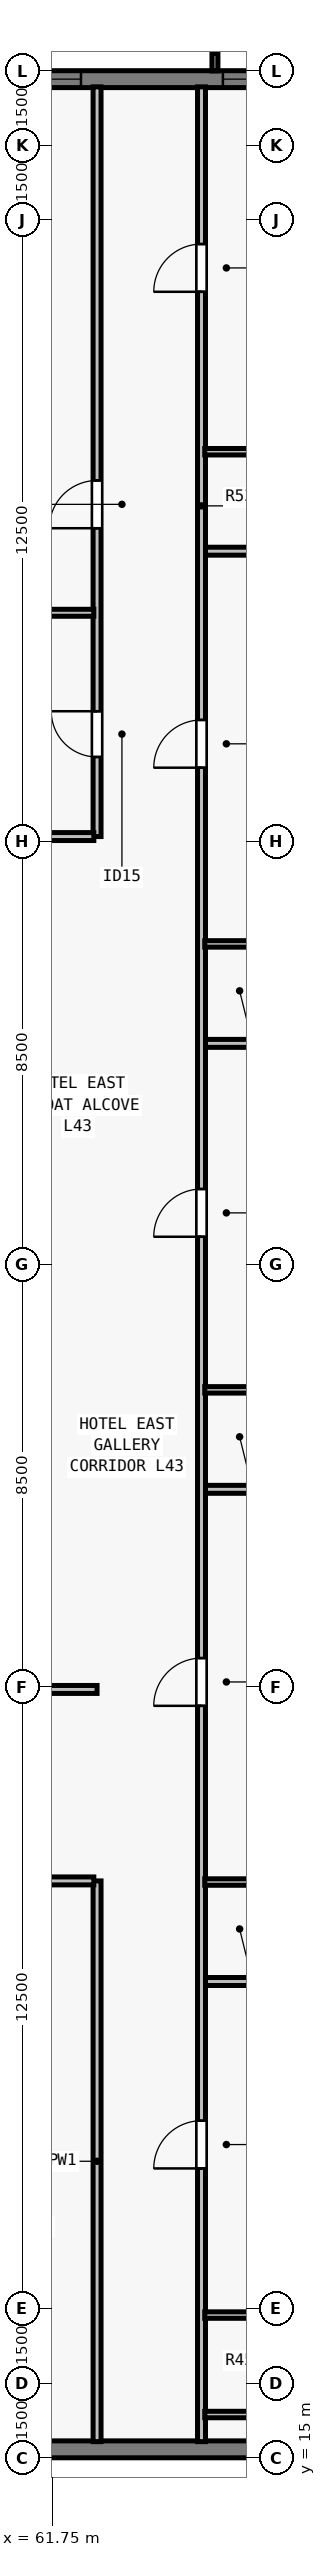
"""IFC4 building model, lengths in metres.
Left out: names, types, materials, properties, quantities, classifications, styles, units other than length and angle.
Written with IfcOpenShell. Run it as: python <this file> out.ifc"""

import sys

from ifc_helpers import new_model, si_unit, direction, frame, frame_2d, origin, place, context, subcontext, project, spatial, rectangle, extrude, element, fill, save


model = new_model("IFC4")
c1 = context("Model", 3, precision=1e-05, world=origin(), true_north=direction((0.0, 1.0)))
c2 = subcontext(c1, "Body", "Model", "MODEL_VIEW")
j1 = project(units=[si_unit("LENGTHUNIT", "METRE"), si_unit("PLANEANGLEUNIT", "RADIAN")], contexts=[c1])
p1 = place(None, origin())
s1 = spatial("IfcSite", under=j1, at=p1, CompositionType="ELEMENT")
p2 = place(p1, origin())
s2 = spatial("IfcBuilding", under=s1, at=p2, CompositionType="ELEMENT")
p3 = place(p2, frame((0.0, 0.0, 158.5)))
s3 = spatial("IfcBuildingStorey", under=s2, at=p3, CompositionType="ELEMENT", Elevation=158.5)
p4 = place(p3, frame((32.0, 62.83, 0.0), z_axis=(0.0, 0.0, 1.0), x_axis=(1.0, 0.0, 0.0)))
e1 = element("IfcWall", 1, at=p4, inside=s3, PredefinedType="SOLIDWALL", context=c2, shape_type="SweptSolid", body=[
    extrude(rectangle(XDim=39.682, YDim=0.34, at=frame_2d((19.841, 0.0))), origin(), (0.0, 0.0, 1.0), 3.28),
])
p5 = place(p4, frame((3.902, 0.0, 0.8)))
e2 = element("IfcOpeningElement", 2, at=p5, cuts=e1, PredefinedType="OPENING", context=c2, shape_type="SweptSolid", body=[
    extrude(rectangle(XDim=1.75, YDim=1.66, at=frame_2d((0.875, 0.83))), frame((0.0, 0.18, 0.0), z_axis=(0.0, -1.0, 0.0), x_axis=(1.0, 0.0, 0.0)), (0.0, 0.0, 1.0), 0.36),
])
p6 = place(p4, frame((8.955, 0.0, 0.8)))
e3 = element("IfcOpeningElement", 3, at=p6, cuts=e1, PredefinedType="OPENING", context=c2, shape_type="SweptSolid", body=[
    extrude(rectangle(XDim=1.35, YDim=1.66, at=frame_2d((0.675, 0.83))), frame((0.0, 0.18, 0.0), z_axis=(0.0, -1.0, 0.0), x_axis=(1.0, 0.0, 0.0)), (0.0, 0.0, 1.0), 0.36),
])
p7 = place(p4, frame((11.859, 0.0, 0.8)))
e4 = element("IfcOpeningElement", 4, at=p7, cuts=e1, PredefinedType="OPENING", context=c2, shape_type="SweptSolid", body=[
    extrude(rectangle(XDim=1.75, YDim=1.66, at=frame_2d((0.875, 0.83))), frame((0.0, 0.18, 0.0), z_axis=(0.0, -1.0, 0.0), x_axis=(1.0, 0.0, 0.0)), (0.0, 0.0, 1.0), 0.36),
])
p8 = place(p4, frame((16.062, 0.0, 0.8)))
e5 = element("IfcOpeningElement", 5, at=p8, cuts=e1, PredefinedType="OPENING", context=c2, shape_type="SweptSolid", body=[
    extrude(rectangle(XDim=1.35, YDim=1.66, at=frame_2d((0.675, 0.83))), frame((0.0, 0.18, 0.0), z_axis=(0.0, -1.0, 0.0), x_axis=(1.0, 0.0, 0.0)), (0.0, 0.0, 1.0), 0.36),
])
p9 = place(p4, frame((18.966, 0.0, 0.8)))
e6 = element("IfcOpeningElement", 6, at=p9, cuts=e1, PredefinedType="OPENING", context=c2, shape_type="SweptSolid", body=[
    extrude(rectangle(XDim=1.75, YDim=1.66, at=frame_2d((0.875, 0.83))), frame((0.0, 0.18, 0.0), z_axis=(0.0, -1.0, 0.0), x_axis=(1.0, 0.0, 0.0)), (0.0, 0.0, 1.0), 0.36),
])
p10 = place(p4, frame((22.719, 0.0, 0.8)))
e7 = element("IfcOpeningElement", 7, at=p10, cuts=e1, PredefinedType="OPENING", context=c2, shape_type="SweptSolid", body=[
    extrude(rectangle(XDim=1.35, YDim=1.66, at=frame_2d((0.675, 0.83))), frame((0.0, 0.18, 0.0), z_axis=(0.0, -1.0, 0.0), x_axis=(1.0, 0.0, 0.0)), (0.0, 0.0, 1.0), 0.36),
])
p11 = place(p4, frame((26.073, 0.0, 0.8)))
e8 = element("IfcOpeningElement", 8, at=p11, cuts=e1, PredefinedType="OPENING", context=c2, shape_type="SweptSolid", body=[
    extrude(rectangle(XDim=1.75, YDim=1.66, at=frame_2d((0.875, 0.83))), frame((0.0, 0.18, 0.0), z_axis=(0.0, -1.0, 0.0), x_axis=(1.0, 0.0, 0.0)), (0.0, 0.0, 1.0), 0.36),
])
p12 = place(p4, frame((28.977, 0.0, 0.8)))
e9 = element("IfcOpeningElement", 9, at=p12, cuts=e1, PredefinedType="OPENING", context=c2, shape_type="SweptSolid", body=[
    extrude(rectangle(XDim=1.35, YDim=1.66, at=frame_2d((0.675, 0.83))), frame((0.0, 0.18, 0.0), z_axis=(0.0, -1.0, 0.0), x_axis=(1.0, 0.0, 0.0)), (0.0, 0.0, 1.0), 0.36),
])
p13 = place(p4, frame((33.18, 0.0, 0.8)))
e10 = element("IfcOpeningElement", 10, at=p13, cuts=e1, PredefinedType="OPENING", context=c2, shape_type="SweptSolid", body=[
    extrude(rectangle(XDim=1.75, YDim=1.66, at=frame_2d((0.875, 0.83))), frame((0.0, 0.18, 0.0), z_axis=(0.0, -1.0, 0.0), x_axis=(1.0, 0.0, 0.0)), (0.0, 0.0, 1.0), 0.36),
])
p14 = place(p3, frame((72.0, 15.17, 0.0), z_axis=(0.0, 0.0, 1.0), x_axis=(-1.0, 0.0, 0.0)))
e11 = element("IfcWall", 11, at=p14, inside=s3, PredefinedType="SOLIDWALL", context=c2, shape_type="SweptSolid", body=[
    extrude(rectangle(XDim=15.482, YDim=0.34, at=frame_2d((7.741, 0.0))), origin(), (0.0, 0.0, 1.0), 3.28),
])
p15 = place(p14, frame((11.627, 0.0, 0.8)))
e12 = element("IfcOpeningElement", 12, at=p15, cuts=e11, PredefinedType="OPENING", context=c2, shape_type="SweptSolid", body=[
    extrude(rectangle(XDim=1.75, YDim=1.66, at=frame_2d((0.875, 0.83))), frame((0.0, 0.18, 0.0), z_axis=(0.0, -1.0, 0.0), x_axis=(1.0, 0.0, 0.0)), (0.0, 0.0, 1.0), 0.36),
])
p16 = place(p3, frame((64.75, 15.325, 0.0), z_axis=(0.0, 0.0, 1.0), x_axis=(0.0, 1.0, 0.0)))
e13 = element("IfcWall", 13, at=p16, inside=s3, PredefinedType="PARTITIONING", context=c2, shape_type="SweptSolid", body=[
    extrude(rectangle(XDim=47.35, YDim=0.16, at=frame_2d((23.675, 0.0))), origin(), (0.0, 0.0, 1.0), 2.555),
])
p17 = place(p16, frame((5.494, 0.0, 0.0)))
e14 = element("IfcOpeningElement", 14, at=p17, cuts=e13, PredefinedType="OPENING", context=c2, shape_type="SweptSolid", body=[
    extrude(rectangle(XDim=0.96, YDim=2.15, at=frame_2d((0.48, 1.075))), frame((0.0, 0.09, 0.0), z_axis=(0.0, -1.0, 0.0), x_axis=(1.0, 0.0, 0.0)), (0.0, 0.0, 1.0), 0.18),
])
p18 = place(p16, frame((14.796, 0.0, 0.0)))
e15 = element("IfcOpeningElement", 15, at=p18, cuts=e13, PredefinedType="OPENING", context=c2, shape_type="SweptSolid", body=[
    extrude(rectangle(XDim=0.96, YDim=2.15, at=frame_2d((0.48, 1.075))), frame((0.0, 0.09, 0.0), z_axis=(0.0, -1.0, 0.0), x_axis=(1.0, 0.0, 0.0)), (0.0, 0.0, 1.0), 0.18),
])
p19 = place(p16, frame((24.228, 0.0, 0.0)))
e16 = element("IfcOpeningElement", 16, at=p19, cuts=e13, PredefinedType="OPENING", context=c2, shape_type="SweptSolid", body=[
    extrude(rectangle(XDim=0.96, YDim=2.15, at=frame_2d((0.48, 1.075))), frame((0.0, 0.09, 0.0), z_axis=(0.0, -1.0, 0.0), x_axis=(1.0, 0.0, 0.0)), (0.0, 0.0, 1.0), 0.18),
])
p20 = place(p16, frame((33.66, 0.0, 0.0)))
e17 = element("IfcOpeningElement", 17, at=p20, cuts=e13, PredefinedType="OPENING", context=c2, shape_type="SweptSolid", body=[
    extrude(rectangle(XDim=0.96, YDim=2.15, at=frame_2d((0.48, 1.075))), frame((0.0, 0.09, 0.0), z_axis=(0.0, -1.0, 0.0), x_axis=(1.0, 0.0, 0.0)), (0.0, 0.0, 1.0), 0.18),
])
p21 = place(p16, frame((43.229, 0.0, 0.0)))
e18 = element("IfcOpeningElement", 18, at=p21, cuts=e13, PredefinedType="OPENING", context=c2, shape_type="SweptSolid", body=[
    extrude(rectangle(XDim=0.96, YDim=2.15, at=frame_2d((0.48, 1.075))), frame((0.0, 0.09, 0.0), z_axis=(0.0, -1.0, 0.0), x_axis=(1.0, 0.0, 0.0)), (0.0, 0.0, 1.0), 0.18),
])
p22 = place(p3, frame((62.65, 15.325, 0.0), z_axis=(0.0, 0.0, 1.0), x_axis=(0.0, 1.0, 0.0)))
e19 = element("IfcWall", 19, at=p22, inside=s3, PredefinedType="PARTITIONING", context=c2, shape_type="SweptSolid", body=[
    extrude(rectangle(XDim=11.275, YDim=0.16, at=frame_2d((5.638, 0.0))), origin(), (0.0, 0.0, 1.0), 3.28),
])
p23 = place(p3, frame((62.65, 47.6, 0.0), z_axis=(0.0, 0.0, 1.0), x_axis=(0.0, 1.0, 0.0)))
e20 = element("IfcWall", 20, at=p23, inside=s3, PredefinedType="PARTITIONING", context=c2, shape_type="SweptSolid", body=[
    extrude(rectangle(XDim=15.075, YDim=0.16, at=frame_2d((7.538, 0.0))), origin(), (0.0, 0.0, 1.0), 2.555),
])
p24 = place(p23, frame((1.6, 0.0, 0.0)))
e21 = element("IfcOpeningElement", 21, at=p24, cuts=e20, PredefinedType="OPENING", context=c2, shape_type="SweptSolid", body=[
    extrude(rectangle(XDim=0.92, YDim=2.12, at=frame_2d((0.46, 1.06))), frame((0.0, 0.09, 0.0), z_axis=(0.0, -1.0, 0.0), x_axis=(1.0, 0.0, 0.0)), (0.0, 0.0, 1.0), 0.18),
])
p25 = place(p23, frame((6.2, 0.0, 0.0)))
e22 = element("IfcOpeningElement", 22, at=p25, cuts=e20, PredefinedType="OPENING", context=c2, shape_type="SweptSolid", body=[
    extrude(rectangle(XDim=0.96, YDim=2.12, at=frame_2d((0.48, 1.06))), frame((0.0, 0.09, 0.0), z_axis=(0.0, -1.0, 0.0), x_axis=(1.0, 0.0, 0.0)), (0.0, 0.0, 1.0), 0.18),
])
p26 = place(p3, frame((60.765, 30.45, 0.0), z_axis=(0.0, 0.0, 1.0), x_axis=(1.0, 0.0, 0.0)))
e23 = element("IfcWall", 23, at=p26, inside=s3, PredefinedType="PARTITIONING", context=c2, shape_type="SweptSolid", body=[
    extrude(rectangle(XDim=1.885, YDim=0.16, at=frame_2d((0.942, 0.0))), origin(), (0.0, 0.0, 1.0), 3.28),
])
p27 = place(p3, frame((60.765, 47.6, 0.0), z_axis=(0.0, 0.0, 1.0), x_axis=(1.0, 0.0, 0.0)))
e24 = element("IfcWall", 24, at=p27, inside=s3, PredefinedType="PARTITIONING", context=c2, shape_type="SweptSolid", body=[
    extrude(rectangle(XDim=1.82, YDim=0.16, at=frame_2d((0.91, 0.0))), origin(), (0.0, 0.0, 1.0), 3.28),
])
p28 = place(p3, frame((40.515, 26.6, 0.0), z_axis=(0.0, 0.0, 1.0), x_axis=(1.0, 0.0, 0.0)))
e25 = element("IfcWall", 25, at=p28, inside=s3, PredefinedType="PARTITIONING", context=c2, shape_type="SweptSolid", body=[
    extrude(rectangle(XDim=22.07, YDim=0.16, at=frame_2d((11.035, 0.0))), origin(), (0.0, 0.0, 1.0), 3.28),
])
p29 = place(p28, frame((3.072, 0.0, 0.0)))
e26 = element("IfcOpeningElement", 26, at=p29, cuts=e25, PredefinedType="OPENING", context=c2, shape_type="SweptSolid", body=[
    extrude(rectangle(XDim=0.96, YDim=2.15, at=frame_2d((0.48, 1.075))), frame((0.0, 0.09, 0.0), z_axis=(0.0, -1.0, 0.0), x_axis=(1.0, 0.0, 0.0)), (0.0, 0.0, 1.0), 0.18),
])
p30 = place(p28, frame((5.362, 0.0, 0.0)))
e27 = element("IfcOpeningElement", 27, at=p30, cuts=e25, PredefinedType="OPENING", context=c2, shape_type="SweptSolid", body=[
    extrude(rectangle(XDim=0.96, YDim=2.15, at=frame_2d((0.48, 1.075))), frame((0.0, 0.09, 0.0), z_axis=(0.0, -1.0, 0.0), x_axis=(1.0, 0.0, 0.0)), (0.0, 0.0, 1.0), 0.18),
])
p31 = place(p28, frame((11.566, 0.0, 0.0)))
e28 = element("IfcOpeningElement", 28, at=p31, cuts=e25, PredefinedType="OPENING", context=c2, shape_type="SweptSolid", body=[
    extrude(rectangle(XDim=0.96, YDim=2.15, at=frame_2d((0.48, 1.075))), frame((0.0, 0.09, 0.0), z_axis=(0.0, -1.0, 0.0), x_axis=(1.0, 0.0, 0.0)), (0.0, 0.0, 1.0), 0.18),
])
p32 = place(p28, frame((14.178, 0.0, 0.0)))
e29 = element("IfcOpeningElement", 29, at=p32, cuts=e25, PredefinedType="OPENING", context=c2, shape_type="SweptSolid", body=[
    extrude(rectangle(XDim=0.96, YDim=2.15, at=frame_2d((0.48, 1.075))), frame((0.0, 0.09, 0.0), z_axis=(0.0, -1.0, 0.0), x_axis=(1.0, 0.0, 0.0)), (0.0, 0.0, 1.0), 0.18),
])
p33 = place(p28, frame((20.099, 0.0, 0.0)))
e30 = element("IfcOpeningElement", 30, at=p33, cuts=e25, PredefinedType="OPENING", context=c2, shape_type="SweptSolid", body=[
    extrude(rectangle(XDim=0.96, YDim=2.15, at=frame_2d((0.48, 1.075))), frame((0.0, 0.09, 0.0), z_axis=(0.0, -1.0, 0.0), x_axis=(1.0, 0.0, 0.0)), (0.0, 0.0, 1.0), 0.18),
])
p34 = place(p3, frame((53.555, 52.1, 0.0), z_axis=(0.0, 0.0, 1.0), x_axis=(1.0, 0.0, 0.0)))
e31 = element("IfcWall", 31, at=p34, inside=s3, PredefinedType="PARTITIONING", context=c2, shape_type="SweptSolid", body=[
    extrude(rectangle(XDim=9.03, YDim=0.14, at=frame_2d((4.515, 0.0))), origin(), (0.0, 0.0, 1.0), 3.28),
])
for number, where, z_axis, x_axis in (
    (32, (64.815, 15.87, 0.0), (0.0, 0.0, 1.0), (1.0, 0.0, 0.0)),
    (33, (64.815, 17.87, 0.0), (0.0, 0.0, 1.0), (1.0, 0.0, 0.0)),
):
    element("IfcWall", number, at=place(p3, frame(where, z_axis=z_axis, x_axis=x_axis)), inside=s3, PredefinedType="PLUMBINGWALL", context=c2, shape_type="SweptSolid", body=[
        extrude(rectangle(XDim=2.315, YDim=0.13, at=frame_2d((1.157, 0.0))), origin(), (0.0, 0.0, 1.0), 3.28),
    ])
p35 = place(p3, frame((64.83, 24.577, 0.0), z_axis=(0.0, 0.0, 1.0), x_axis=(1.0, 0.0, 0.0)))
e34 = element("IfcWall", 34, at=p35, inside=s3, PredefinedType="PARTITIONING", context=c2, shape_type="SweptSolid", body=[
    extrude(rectangle(XDim=10.845, YDim=0.16, at=frame_2d((5.422, 0.0))), origin(), (0.0, 0.0, 1.0), 2.896),
])
p36 = place(p3, frame((64.815, 26.577, 0.0), z_axis=(0.0, 0.0, 1.0), x_axis=(1.0, 0.0, 0.0)))
e35 = element("IfcWall", 35, at=p36, inside=s3, PredefinedType="PLUMBINGWALL", context=c2, shape_type="SweptSolid", body=[
    extrude(rectangle(XDim=2.315, YDim=0.13, at=frame_2d((1.157, 0.0))), origin(), (0.0, 0.0, 1.0), 2.896),
])
p37 = place(p3, frame((64.83, 34.474, 0.0), z_axis=(0.0, 0.0, 1.0), x_axis=(1.0, 0.0, 0.0)))
e36 = element("IfcWall", 36, at=p37, inside=s3, PredefinedType="PARTITIONING", context=c2, shape_type="SweptSolid", body=[
    extrude(rectangle(XDim=10.845, YDim=0.16, at=frame_2d((5.422, 0.0))), origin(), (0.0, 0.0, 1.0), 3.28),
])
p38 = place(p3, frame((64.815, 36.474, 0.0), z_axis=(0.0, 0.0, 1.0), x_axis=(1.0, 0.0, 0.0)))
e37 = element("IfcWall", 37, at=p38, inside=s3, PredefinedType="PLUMBINGWALL", context=c2, shape_type="SweptSolid", body=[
    extrude(rectangle(XDim=2.315, YDim=0.13, at=frame_2d((1.157, 0.0))), origin(), (0.0, 0.0, 1.0), 3.28),
])
p39 = place(p3, frame((64.83, 43.441, 0.0), z_axis=(0.0, 0.0, 1.0), x_axis=(1.0, 0.0, 0.0)))
e38 = element("IfcWall", 38, at=p39, inside=s3, PredefinedType="PARTITIONING", context=c2, shape_type="SweptSolid", body=[
    extrude(rectangle(XDim=10.845, YDim=0.16, at=frame_2d((5.422, 0.0))), origin(), (0.0, 0.0, 1.0), 3.28),
])
p40 = place(p3, frame((64.815, 45.441, 0.0), z_axis=(0.0, 0.0, 1.0), x_axis=(1.0, 0.0, 0.0)))
e39 = element("IfcWall", 39, at=p40, inside=s3, PredefinedType="PLUMBINGWALL", context=c2, shape_type="SweptSolid", body=[
    extrude(rectangle(XDim=2.315, YDim=0.13, at=frame_2d((1.157, 0.0))), origin(), (0.0, 0.0, 1.0), 3.28),
])
p41 = place(p3, frame((64.83, 53.338, 0.0), z_axis=(0.0, 0.0, 1.0), x_axis=(1.0, 0.0, 0.0)))
e40 = element("IfcWall", 40, at=p41, inside=s3, PredefinedType="PARTITIONING", context=c2, shape_type="SweptSolid", body=[
    extrude(rectangle(XDim=10.845, YDim=0.16, at=frame_2d((5.422, 0.0))), origin(), (0.0, 0.0, 1.0), 2.896),
])
p42 = place(p3, frame((64.815, 55.338, 0.0), z_axis=(0.0, 0.0, 1.0), x_axis=(1.0, 0.0, 0.0)))
e41 = element("IfcWall", 41, at=p42, inside=s3, PredefinedType="PLUMBINGWALL", context=c2, shape_type="SweptSolid", body=[
    extrude(rectangle(XDim=2.315, YDim=0.13, at=frame_2d((1.157, 0.0))), origin(), (0.0, 0.0, 1.0), 3.28),
])
p43 = place(p12, origin())
e42 = element("IfcWindow", 42, at=p43, inside=s3, PartitioningType="SINGLE_PANEL", PredefinedType="WINDOW", context=c2, shape_type="SweptSolid", body=[
    extrude(rectangle(XDim=1.35, YDim=1.66, at=frame_2d((0.675, 0.83))), frame((0.0, -0.05, 0.0), z_axis=(0.0, -1.0, 0.0), x_axis=(1.0, 0.0, 0.0)), (0.0, 0.0, 1.0), 0.06),
])
fill(e9, e42)
p44 = place(p13, origin())
e43 = element("IfcWindow", 43, at=p44, inside=s3, PartitioningType="SINGLE_PANEL", PredefinedType="WINDOW", context=c2, shape_type="SweptSolid", body=[
    extrude(rectangle(XDim=1.75, YDim=1.66, at=frame_2d((0.875, 0.83))), frame((0.0, -0.05, 0.0), z_axis=(0.0, -1.0, 0.0), x_axis=(1.0, 0.0, 0.0)), (0.0, 0.0, 1.0), 0.06),
])
fill(e10, e43)
p45 = place(p24, origin())
e44 = element("IfcDoor", 44, at=p45, inside=s3, OperationType="SINGLE_SWING_RIGHT", PredefinedType="DOOR", context=c2, shape_type="SweptSolid", body=[
    extrude(rectangle(XDim=0.92, YDim=2.12, at=frame_2d((0.46, 1.06))), frame((0.0, 0.025, 0.0), z_axis=(0.0, -1.0, 0.0), x_axis=(1.0, 0.0, 0.0)), (0.0, 0.0, 1.0), 0.05),
])
fill(e21, e44)
p46 = place(p25, origin())
e45 = element("IfcDoor", 45, at=p46, inside=s3, OperationType="SINGLE_SWING_LEFT", PredefinedType="DOOR", context=c2, shape_type="SweptSolid", body=[
    extrude(rectangle(XDim=0.96, YDim=2.12, at=frame_2d((0.48, 1.06))), frame((0.0, 0.025, 0.0), z_axis=(0.0, -1.0, 0.0), x_axis=(1.0, 0.0, 0.0)), (0.0, 0.0, 1.0), 0.05),
])
fill(e22, e45)
p47 = place(p17, origin())
e46 = element("IfcDoor", 46, at=p47, inside=s3, OperationType="SINGLE_SWING_LEFT", PredefinedType="DOOR", context=c2, shape_type="SweptSolid", body=[
    extrude(rectangle(XDim=0.96, YDim=2.15, at=frame_2d((0.48, 1.075))), frame((0.0, 0.025, 0.0), z_axis=(0.0, -1.0, 0.0), x_axis=(1.0, 0.0, 0.0)), (0.0, 0.0, 1.0), 0.05),
])
fill(e14, e46)
p48 = place(p18, origin())
e47 = element("IfcDoor", 47, at=p48, inside=s3, OperationType="SINGLE_SWING_LEFT", PredefinedType="DOOR", context=c2, shape_type="SweptSolid", body=[
    extrude(rectangle(XDim=0.96, YDim=2.15, at=frame_2d((0.48, 1.075))), frame((0.0, 0.025, 0.0), z_axis=(0.0, -1.0, 0.0), x_axis=(1.0, 0.0, 0.0)), (0.0, 0.0, 1.0), 0.05),
])
fill(e15, e47)
p49 = place(p19, origin())
e48 = element("IfcDoor", 48, at=p49, inside=s3, OperationType="SINGLE_SWING_LEFT", PredefinedType="DOOR", context=c2, shape_type="SweptSolid", body=[
    extrude(rectangle(XDim=0.96, YDim=2.15, at=frame_2d((0.48, 1.075))), frame((0.0, 0.025, 0.0), z_axis=(0.0, -1.0, 0.0), x_axis=(1.0, 0.0, 0.0)), (0.0, 0.0, 1.0), 0.05),
])
fill(e16, e48)
p50 = place(p20, origin())
e49 = element("IfcDoor", 49, at=p50, inside=s3, OperationType="SINGLE_SWING_LEFT", PredefinedType="DOOR", context=c2, shape_type="SweptSolid", body=[
    extrude(rectangle(XDim=0.96, YDim=2.15, at=frame_2d((0.48, 1.075))), frame((0.0, 0.025, 0.0), z_axis=(0.0, -1.0, 0.0), x_axis=(1.0, 0.0, 0.0)), (0.0, 0.0, 1.0), 0.05),
])
fill(e17, e49)
p51 = place(p21, origin())
e50 = element("IfcDoor", 50, at=p51, inside=s3, OperationType="SINGLE_SWING_LEFT", PredefinedType="DOOR", context=c2, shape_type="SweptSolid", body=[
    extrude(rectangle(XDim=0.96, YDim=2.15, at=frame_2d((0.48, 1.075))), frame((0.0, 0.025, 0.0), z_axis=(0.0, -1.0, 0.0), x_axis=(1.0, 0.0, 0.0)), (0.0, 0.0, 1.0), 0.05),
])
fill(e18, e50)
save(model, sys.argv[1])
